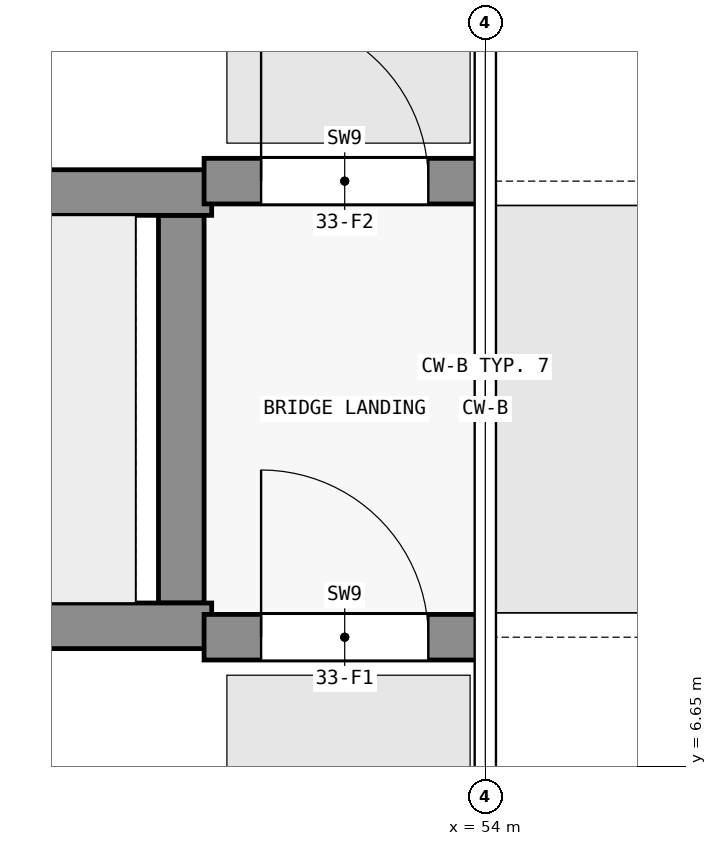
"""IFC4 building model, lengths in metres.
Left out: names, types, materials, properties, quantities, classifications, styles, units other than length and angle.
Written with IfcOpenShell. Run it as: python <this file> out.ifc"""

import sys

from ifc_helpers import new_model, si_unit, direction, frame, frame_2d, origin, place, context, subcontext, project, spatial, rectangle, extrude, element, fill, save


model = new_model("IFC4")
c1 = context("Model", 3, precision=1e-05, world=origin(), true_north=direction((0.0, 1.0)))
c2 = subcontext(c1, "Body", "Model", "MODEL_VIEW")
j1 = project(units=[si_unit("LENGTHUNIT", "METRE"), si_unit("PLANEANGLEUNIT", "RADIAN")], contexts=[c1])
p1 = place(None, origin())
s1 = spatial("IfcSite", under=j1, at=p1, CompositionType="ELEMENT")
p2 = place(p1, origin())
s2 = spatial("IfcBuilding", under=s1, at=p2, CompositionType="ELEMENT")
p3 = place(p2, frame((0.0, 0.0, 128.6)))
s3 = spatial("IfcBuildingStorey", under=s2, at=p3, CompositionType="ELEMENT", Elevation=128.6)
p4 = place(p3, frame((52.0, 7.725, 0.0), z_axis=(0.0, 0.0, 1.0), x_axis=(0.0, 1.0, 0.0)))
e1 = element("IfcWall", 1, at=p4, inside=s3, PredefinedType="SHEAR", context=c2, shape_type="SweptSolid", body=[
    extrude(rectangle(XDim=2.55, YDim=0.3, at=frame_2d((1.275, 0.0))), origin(), (0.0, 0.0, 1.0), 6.0),
])
for number, where, z_axis, x_axis in (
    (2, (45.0, 7.575, 0.0), (0.0, 0.0, 1.0), (1.0, 0.0, 0.0)),
    (3, (45.0, 10.425, 0.0), (0.0, 0.0, 1.0), (1.0, 0.0, 0.0)),
):
    element("IfcWall", number, at=place(p3, frame(where, z_axis=z_axis, x_axis=x_axis)), inside=s3, PredefinedType="SHEAR", context=c2, shape_type="SweptSolid", body=[
        extrude(rectangle(XDim=7.2, YDim=0.3, at=frame_2d((3.6, 0.0))), origin(), (0.0, 0.0, 1.0), 6.0),
    ])
p5 = place(p3, frame((52.15, 7.5, 0.0), z_axis=(0.0, 0.0, 1.0), x_axis=(1.0, 0.0, 0.0)))
e4 = element("IfcWall", 4, at=p5, inside=s3, PredefinedType="SHEAR", context=c2, shape_type="SweptSolid", body=[
    extrude(rectangle(XDim=1.85, YDim=0.3, at=frame_2d((0.925, 0.0))), origin(), (0.0, 0.0, 1.0), 5.7),
])
p6 = place(p5, frame((0.375, 0.0, 0.0)))
e5 = element("IfcOpeningElement", 5, at=p6, cuts=e4, PredefinedType="OPENING", context=c2, shape_type="SweptSolid", body=[
    extrude(rectangle(XDim=1.1, YDim=2.1, at=frame_2d((0.55, 1.05))), frame((0.0, 0.16, 0.0), z_axis=(0.0, -1.0, 0.0), x_axis=(1.0, 0.0, 0.0)), (0.0, 0.0, 1.0), 0.32),
])
p7 = place(p3, frame((52.15, 10.5, 0.0), z_axis=(0.0, 0.0, 1.0), x_axis=(1.0, 0.0, 0.0)))
e6 = element("IfcWall", 6, at=p7, inside=s3, PredefinedType="SHEAR", context=c2, shape_type="SweptSolid", body=[
    extrude(rectangle(XDim=1.85, YDim=0.3, at=frame_2d((0.925, 0.0))), origin(), (0.0, 0.0, 1.0), 5.7),
])
p8 = place(p7, frame((0.375, 0.0, 0.0)))
e7 = element("IfcOpeningElement", 7, at=p8, cuts=e6, PredefinedType="OPENING", context=c2, shape_type="SweptSolid", body=[
    extrude(rectangle(XDim=1.1, YDim=2.1, at=frame_2d((0.55, 1.05))), frame((0.0, 0.16, 0.0), z_axis=(0.0, -1.0, 0.0), x_axis=(1.0, 0.0, 0.0)), (0.0, 0.0, 1.0), 0.32),
])
p9 = place(p6, origin())
e8 = element("IfcDoor", 8, at=p9, inside=s3, OperationType="SINGLE_SWING_LEFT", PredefinedType="DOOR", context=c2, shape_type="SweptSolid", body=[
    extrude(rectangle(XDim=1.1, YDim=2.1, at=frame_2d((0.55, 1.05))), frame((0.0, 0.025, 0.0), z_axis=(0.0, -1.0, 0.0), x_axis=(1.0, 0.0, 0.0)), (0.0, 0.0, 1.0), 0.05),
])
fill(e5, e8)
p10 = place(p8, origin())
e9 = element("IfcDoor", 9, at=p10, inside=s3, OperationType="SINGLE_SWING_LEFT", PredefinedType="DOOR", context=c2, shape_type="SweptSolid", body=[
    extrude(rectangle(XDim=1.1, YDim=2.1, at=frame_2d((0.55, 1.05))), frame((0.0, 0.025, 0.0), z_axis=(0.0, -1.0, 0.0), x_axis=(1.0, 0.0, 0.0)), (0.0, 0.0, 1.0), 0.05),
])
fill(e7, e9)
save(model, sys.argv[1])
